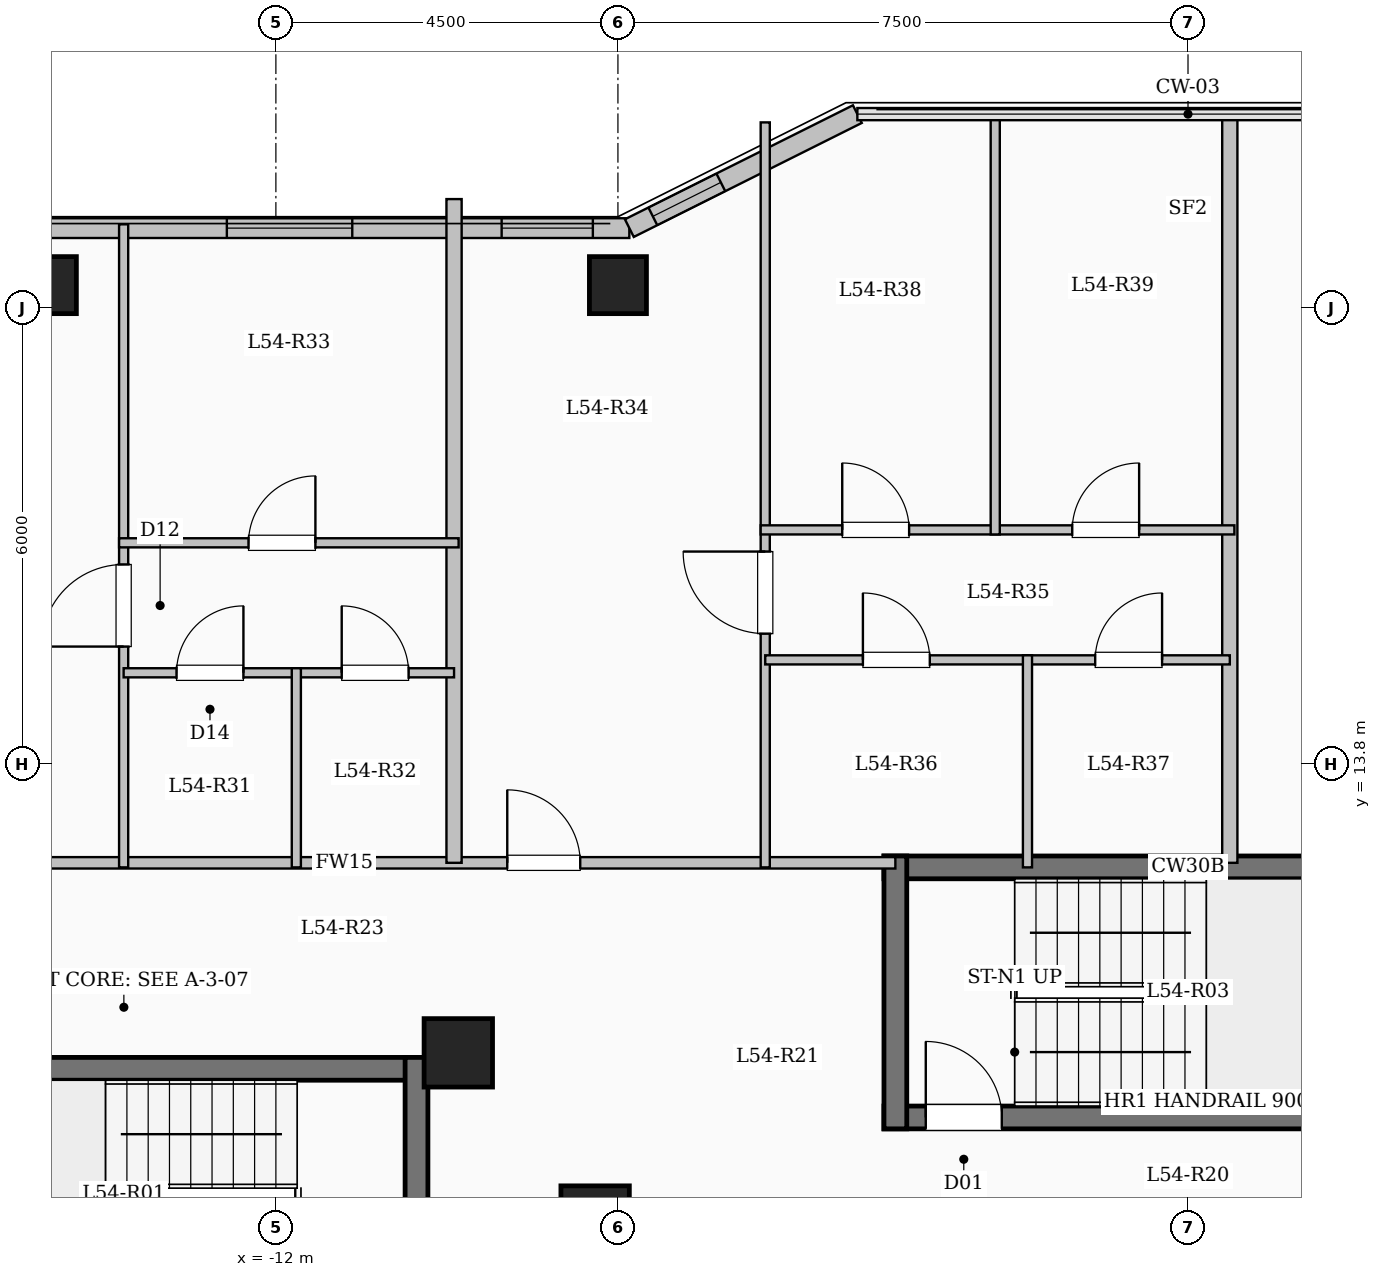
"""IFC4 building model, lengths in metres.
Left out: names, types, materials, properties, quantities, classifications, styles, units other than length and angle.
Written with IfcOpenShell. Run it as: python <this file> out.ifc"""

import sys

from ifc_helpers import new_model, si_unit, direction, frame, frame_2d, origin, origin_2d, place, context, subcontext, project, spatial, rectangle, extrude, element, fill, save


model = new_model("IFC4")
c1 = context("Model", 3, precision=1e-05, world=origin(), true_north=direction((0.0, 1.0)))
c2 = subcontext(c1, "Body", "Model", "MODEL_VIEW")
j1 = project(units=[si_unit("LENGTHUNIT", "METRE"), si_unit("PLANEANGLEUNIT", "RADIAN")], contexts=[c1])
p1 = place(None, origin())
s1 = spatial("IfcSite", under=j1, at=p1, CompositionType="ELEMENT")
p2 = place(p1, origin())
s2 = spatial("IfcBuilding", under=s1, at=p2, CompositionType="ELEMENT")
p3 = place(p2, frame((0.0, 0.0, 200.3)))
s3 = spatial("IfcBuildingStorey", under=s2, at=p3, CompositionType="ELEMENT", Elevation=200.3)
for number, where, z_axis, x_axis in (
    (1, (-7.8, 7.8, 0.0), (0.0, 0.0, 1.0), (1.0, 0.0, 0.0)),
    (2, (-9.6, 10.0, 0.0), (0.0, 0.0, 1.0), (1.0, 0.0, 0.0)),
):
    element("IfcColumn", number, at=place(p3, frame(where, z_axis=z_axis, x_axis=x_axis)), inside=s3, PredefinedType="COLUMN", context=c2, shape_type="SweptSolid", body=[
        extrude(rectangle(XDim=0.9, YDim=0.9, at=origin_2d()), origin(), (0.0, 0.0, 1.0), 3.35),
    ])
for number, where, z_axis, x_axis in (
    (3, (-15.0, 20.1, 0.0), (0.0, 0.0, 1.0), (1.0, 0.0, 0.0)),
    (4, (-7.5, 20.1, 0.0), (0.0, 0.0, 1.0), (1.0, 0.0, 0.0)),
):
    element("IfcColumn", number, at=place(p3, frame(where, z_axis=z_axis, x_axis=x_axis)), inside=s3, PredefinedType="COLUMN", context=c2, shape_type="SweptSolid", body=[
        extrude(rectangle(XDim=0.75, YDim=0.75, at=origin_2d()), origin(), (0.0, 0.0, 1.0), 3.35),
    ])
p4 = place(p3, frame((-18.45, 20.85, 0.0), z_axis=(0.0, 0.0, 1.0), x_axis=(1.0, 0.0, 0.0)))
e5 = element("IfcWall", 5, at=p4, inside=s3, PredefinedType="SOLIDWALL", context=c2, shape_type="SweptSolid", body=[
    extrude(rectangle(XDim=11.1, YDim=0.26, at=frame_2d((5.55, 0.0))), origin(), (0.0, 0.0, 1.0), 3.1),
])
p5 = place(p4, frame((1.16, 0.0, 0.9)))
e6 = element("IfcOpeningElement", 6, at=p5, cuts=e5, PredefinedType="OPENING", context=c2, shape_type="SweptSolid", body=[
    extrude(rectangle(XDim=2.2, YDim=1.75, at=frame_2d((1.1, 0.875))), frame((0.0, 0.14, 0.0), z_axis=(0.0, -1.0, 0.0), x_axis=(1.0, 0.0, 0.0)), (0.0, 0.0, 1.0), 0.28),
])
p6 = place(p4, frame((5.805, 0.0, 0.9)))
e7 = element("IfcOpeningElement", 7, at=p6, cuts=e5, PredefinedType="OPENING", context=c2, shape_type="SweptSolid", body=[
    extrude(rectangle(XDim=1.65, YDim=1.6, at=frame_2d((0.825, 0.8))), frame((0.0, 0.14, 0.0), z_axis=(0.0, -1.0, 0.0), x_axis=(1.0, 0.0, 0.0)), (0.0, 0.0, 1.0), 0.28),
])
p7 = place(p4, frame((9.42, 0.0, 0.95)))
e8 = element("IfcOpeningElement", 8, at=p7, cuts=e5, PredefinedType="OPENING", context=c2, shape_type="SweptSolid", body=[
    extrude(rectangle(XDim=1.2, YDim=1.5, at=frame_2d((0.6, 0.75))), frame((0.0, 0.14, 0.0), z_axis=(0.0, -1.0, 0.0), x_axis=(1.0, 0.0, 0.0)), (0.0, 0.0, 1.0), 0.28),
])
p8 = place(p3, frame((-7.35, 20.85, 0.0), z_axis=(0.0, 0.0, 1.0), x_axis=(0.894427191, 0.4472135955, 0.0)))
e9 = element("IfcWall", 9, at=p8, inside=s3, PredefinedType="SOLIDWALL", context=c2, shape_type="SweptSolid", body=[
    extrude(rectangle(XDim=3.354, YDim=0.26, at=frame_2d((1.677, 0.0))), origin(), (0.0, 0.0, 1.0), 3.1),
])
p9 = place(p8, frame((0.346, 0.0, 0.95)))
e10 = element("IfcOpeningElement", 10, at=p9, cuts=e9, PredefinedType="OPENING", context=c2, shape_type="SweptSolid", body=[
    extrude(rectangle(XDim=1.0, YDim=1.5, at=frame_2d((0.5, 0.75))), frame((0.0, 0.14, 0.0), z_axis=(0.0, -1.0, 0.0), x_axis=(1.0, 0.0, 0.0)), (0.0, 0.0, 1.0), 0.28),
])
p10 = place(p3, frame((-18.0, 9.79, 0.0), z_axis=(0.0, 0.0, 1.0), x_axis=(1.0, 0.0, 0.0)))
e11 = element("IfcWall", 11, at=p10, inside=s3, PredefinedType="SHEAR", context=c2, shape_type="SweptSolid", body=[
    extrude(rectangle(XDim=8.0, YDim=0.3, at=frame_2d((4.0, 0.0))), origin(), (0.0, 0.0, 1.0), 3.35),
])
p11 = place(p3, frame((-10.15, 6.35, 0.0), z_axis=(0.0, 0.0, 1.0), x_axis=(0.0, 1.0, 0.0)))
e12 = element("IfcWall", 12, at=p11, inside=s3, PredefinedType="SHEAR", context=c2, shape_type="SweptSolid", body=[
    extrude(rectangle(XDim=3.59, YDim=0.3, at=frame_2d((1.795, 0.0))), origin(), (0.0, 0.0, 1.0), 3.35),
])
p12 = place(p3, frame((-4.0, 12.44, 0.0), z_axis=(0.0, 0.0, 1.0), x_axis=(1.0, 0.0, 0.0)))
e13 = element("IfcWall", 13, at=p12, inside=s3, PredefinedType="SHEAR", context=c2, shape_type="SweptSolid", body=[
    extrude(rectangle(XDim=8.0, YDim=0.3, at=frame_2d((4.0, 0.0))), origin(), (0.0, 0.0, 1.0), 3.35),
])
p13 = place(p3, frame((-4.0, 9.15, 0.0), z_axis=(0.0, 0.0, 1.0), x_axis=(1.0, 0.0, 0.0)))
e14 = element("IfcWall", 14, at=p13, inside=s3, PredefinedType="SHEAR", context=c2, shape_type="SweptSolid", body=[
    extrude(rectangle(XDim=8.0, YDim=0.3, at=frame_2d((4.0, 0.0))), origin(), (0.0, 0.0, 1.0), 3.35),
])
p14 = place(p13, frame((0.55, 0.0, 0.0)))
e15 = element("IfcOpeningElement", 15, at=p14, cuts=e14, PredefinedType="OPENING", context=c2, shape_type="SweptSolid", body=[
    extrude(rectangle(XDim=1.0, YDim=2.15, at=frame_2d((0.5, 1.075))), frame((0.0, 0.16, 0.0), z_axis=(0.0, -1.0, 0.0), x_axis=(1.0, 0.0, 0.0)), (0.0, 0.0, 1.0), 0.32),
])
p15 = place(p3, frame((-3.85, 9.0, 0.0), z_axis=(0.0, 0.0, 1.0), x_axis=(0.0, 1.0, 0.0)))
e16 = element("IfcWall", 16, at=p15, inside=s3, PredefinedType="SHEAR", context=c2, shape_type="SweptSolid", body=[
    extrude(rectangle(XDim=3.59, YDim=0.3, at=frame_2d((1.795, 0.0))), origin(), (0.0, 0.0, 1.0), 3.35),
])
p16 = place(p3, frame((-18.35, 12.5, 0.0), z_axis=(0.0, 0.0, 1.0), x_axis=(1.0, 0.0, 0.0)))
e17 = element("IfcWall", 17, at=p16, inside=s3, PredefinedType="PARTITIONING", context=c2, shape_type="SweptSolid", body=[
    extrude(rectangle(XDim=14.5, YDim=0.15, at=frame_2d((7.25, 0.0))), origin(), (0.0, 0.0, 1.0), 3.1),
])
p17 = place(p16, frame((0.7, 0.0, 0.0)))
e18 = element("IfcOpeningElement", 18, at=p17, cuts=e17, PredefinedType="OPENING", context=c2, shape_type="SweptSolid", body=[
    extrude(rectangle(XDim=0.96, YDim=2.15, at=frame_2d((0.48, 1.075))), frame((0.0, 0.085, 0.0), z_axis=(0.0, -1.0, 0.0), x_axis=(1.0, 0.0, 0.0)), (0.0, 0.0, 1.0), 0.17),
])
p18 = place(p16, frame((9.394, 0.0, 0.0)))
e19 = element("IfcOpeningElement", 19, at=p18, cuts=e17, PredefinedType="OPENING", context=c2, shape_type="SweptSolid", body=[
    extrude(rectangle(XDim=0.96, YDim=2.15, at=frame_2d((0.48, 1.075))), frame((0.0, 0.085, 0.0), z_axis=(0.0, -1.0, 0.0), x_axis=(1.0, 0.0, 0.0)), (0.0, 0.0, 1.0), 0.17),
])
p19 = place(p3, frame((0.55, 12.5, 0.0), z_axis=(0.0, 0.0, 1.0), x_axis=(0.0, 1.0, 0.0)))
e20 = element("IfcWall", 20, at=p19, inside=s3, PredefinedType="SOLIDWALL", context=c2, shape_type="SweptSolid", body=[
    extrude(rectangle(XDim=9.88, YDim=0.2, at=frame_2d((4.94, 0.0))), origin(), (0.0, 0.0, 1.0), 3.1),
])
p20 = place(p3, frame((-9.656, 12.5, 0.0), z_axis=(0.0, 0.0, 1.0), x_axis=(0.0, 1.0, 0.0)))
e21 = element("IfcWall", 21, at=p20, inside=s3, PredefinedType="SOLIDWALL", context=c2, shape_type="SweptSolid", body=[
    extrude(rectangle(XDim=8.732, YDim=0.2, at=frame_2d((4.366, 0.0))), origin(), (0.0, 0.0, 1.0), 3.1),
])
p21 = place(p3, frame((-14.003, 12.44, 0.0), z_axis=(0.0, 0.0, 1.0), x_axis=(0.0, 1.0, 0.0)))
e22 = element("IfcWall", 22, at=p21, inside=s3, PredefinedType="PARTITIONING", context=c2, shape_type="SweptSolid", body=[
    extrude(rectangle(XDim=8.46, YDim=0.12, at=frame_2d((4.23, 0.0))), origin(), (0.0, 0.0, 1.0), 3.1),
])
p22 = place(p21, frame((2.905, 0.0, 0.0)))
e23 = element("IfcOpeningElement", 23, at=p22, cuts=e22, PredefinedType="OPENING", context=c2, shape_type="SweptSolid", body=[
    extrude(rectangle(XDim=1.08, YDim=2.15, at=frame_2d((0.54, 1.075))), frame((0.0, 0.07, 0.0), z_axis=(0.0, -1.0, 0.0), x_axis=(1.0, 0.0, 0.0)), (0.0, 0.0, 1.0), 0.14),
])
p23 = place(p3, frame((-14.003, 15.0, 0.0), z_axis=(0.0, 0.0, 1.0), x_axis=(1.0, 0.0, 0.0)))
e24 = element("IfcWall", 24, at=p23, inside=s3, PredefinedType="PARTITIONING", context=c2, shape_type="SweptSolid", body=[
    extrude(rectangle(XDim=2.272, YDim=0.12, at=frame_2d((1.136, 0.0))), origin(), (0.0, 0.0, 1.0), 3.1),
])
p24 = place(p23, frame((0.696, 0.0, 0.0)))
e25 = element("IfcOpeningElement", 25, at=p24, cuts=e24, PredefinedType="OPENING", context=c2, shape_type="SweptSolid", body=[
    extrude(rectangle(XDim=0.88, YDim=2.1, at=frame_2d((0.44, 1.05))), frame((0.0, 0.07, 0.0), z_axis=(0.0, -1.0, 0.0), x_axis=(1.0, 0.0, 0.0)), (0.0, 0.0, 1.0), 0.14),
])
p25 = place(p3, frame((-11.731, 15.0, 0.0), z_axis=(0.0, 0.0, 1.0), x_axis=(1.0, 0.0, 0.0)))
e26 = element("IfcWall", 26, at=p25, inside=s3, PredefinedType="PARTITIONING", context=c2, shape_type="SweptSolid", body=[
    extrude(rectangle(XDim=2.075, YDim=0.12, at=frame_2d((1.038, 0.0))), origin(), (0.0, 0.0, 1.0), 3.1),
])
p26 = place(p25, frame((0.597, 0.0, 0.0)))
e27 = element("IfcOpeningElement", 27, at=p26, cuts=e26, PredefinedType="OPENING", context=c2, shape_type="SweptSolid", body=[
    extrude(rectangle(XDim=0.88, YDim=2.1, at=frame_2d((0.44, 1.05))), frame((0.0, 0.07, 0.0), z_axis=(0.0, -1.0, 0.0), x_axis=(1.0, 0.0, 0.0)), (0.0, 0.0, 1.0), 0.14),
])
p27 = place(p3, frame((-14.063, 16.71, 0.0), z_axis=(0.0, 0.0, 1.0), x_axis=(1.0, 0.0, 0.0)))
e28 = element("IfcWall", 28, at=p27, inside=s3, PredefinedType="PARTITIONING", context=c2, shape_type="SweptSolid", body=[
    extrude(rectangle(XDim=4.467, YDim=0.12, at=frame_2d((2.233, 0.0))), origin(), (0.0, 0.0, 1.0), 2.725),
])
p28 = place(p27, frame((1.703, 0.0, 0.0)))
e29 = element("IfcOpeningElement", 29, at=p28, cuts=e28, PredefinedType="OPENING", context=c2, shape_type="SweptSolid", body=[
    extrude(rectangle(XDim=0.88, YDim=2.1, at=frame_2d((0.44, 1.05))), frame((0.0, 0.07, 0.0), z_axis=(0.0, -1.0, 0.0), x_axis=(1.0, 0.0, 0.0)), (0.0, 0.0, 1.0), 0.14),
])
p29 = place(p3, frame((-11.731, 12.44, 0.0), z_axis=(0.0, 0.0, 1.0), x_axis=(0.0, 1.0, 0.0)))
e30 = element("IfcWall", 30, at=p29, inside=s3, PredefinedType="PARTITIONING", context=c2, shape_type="SweptSolid", body=[
    extrude(rectangle(XDim=2.62, YDim=0.12, at=frame_2d((1.31, 0.0))), origin(), (0.0, 0.0, 1.0), 3.1),
])
p30 = place(p3, frame((-5.562, 12.44, 0.0), z_axis=(0.0, 0.0, 1.0), x_axis=(0.0, 1.0, 0.0)))
e31 = element("IfcWall", 31, at=p30, inside=s3, PredefinedType="PARTITIONING", context=c2, shape_type="SweptSolid", body=[
    extrude(rectangle(XDim=9.801, YDim=0.12, at=frame_2d((4.9, 0.0))), origin(), (0.0, 0.0, 1.0), 3.1),
])
p31 = place(p30, frame((3.075, 0.0, 0.0)))
e32 = element("IfcOpeningElement", 32, at=p31, cuts=e31, PredefinedType="OPENING", context=c2, shape_type="SweptSolid", body=[
    extrude(rectangle(XDim=1.08, YDim=2.15, at=frame_2d((0.54, 1.075))), frame((0.0, 0.07, 0.0), z_axis=(0.0, -1.0, 0.0), x_axis=(1.0, 0.0, 0.0)), (0.0, 0.0, 1.0), 0.14),
])
p32 = place(p3, frame((-5.562, 15.17, 0.0), z_axis=(0.0, 0.0, 1.0), x_axis=(1.0, 0.0, 0.0)))
e33 = element("IfcWall", 33, at=p32, inside=s3, PredefinedType="PARTITIONING", context=c2, shape_type="SweptSolid", body=[
    extrude(rectangle(XDim=3.45, YDim=0.12, at=frame_2d((1.725, 0.0))), origin(), (0.0, 0.0, 1.0), 3.1),
])
p33 = place(p32, frame((1.285, 0.0, 0.0)))
e34 = element("IfcOpeningElement", 34, at=p33, cuts=e33, PredefinedType="OPENING", context=c2, shape_type="SweptSolid", body=[
    extrude(rectangle(XDim=0.88, YDim=2.1, at=frame_2d((0.44, 1.05))), frame((0.0, 0.07, 0.0), z_axis=(0.0, -1.0, 0.0), x_axis=(1.0, 0.0, 0.0)), (0.0, 0.0, 1.0), 0.14),
])
p34 = place(p3, frame((-2.112, 15.17, 0.0), z_axis=(0.0, 0.0, 1.0), x_axis=(1.0, 0.0, 0.0)))
e35 = element("IfcWall", 35, at=p34, inside=s3, PredefinedType="PARTITIONING", context=c2, shape_type="SweptSolid", body=[
    extrude(rectangle(XDim=2.662, YDim=0.12, at=frame_2d((1.331, 0.0))), origin(), (0.0, 0.0, 1.0), 3.1),
])
p35 = place(p34, frame((0.891, 0.0, 0.0)))
e36 = element("IfcOpeningElement", 36, at=p35, cuts=e35, PredefinedType="OPENING", context=c2, shape_type="SweptSolid", body=[
    extrude(rectangle(XDim=0.88, YDim=2.1, at=frame_2d((0.44, 1.05))), frame((0.0, 0.07, 0.0), z_axis=(0.0, -1.0, 0.0), x_axis=(1.0, 0.0, 0.0)), (0.0, 0.0, 1.0), 0.14),
])
p36 = place(p3, frame((-5.622, 16.88, 0.0), z_axis=(0.0, 0.0, 1.0), x_axis=(1.0, 0.0, 0.0)))
e37 = element("IfcWall", 37, at=p36, inside=s3, PredefinedType="PARTITIONING", context=c2, shape_type="SweptSolid", body=[
    extrude(rectangle(XDim=6.232, YDim=0.12, at=frame_2d((3.116, 0.0))), origin(), (0.0, 0.0, 1.0), 2.725),
])
p37 = place(p36, frame((1.073, 0.0, 0.0)))
e38 = element("IfcOpeningElement", 38, at=p37, cuts=e37, PredefinedType="OPENING", context=c2, shape_type="SweptSolid", body=[
    extrude(rectangle(XDim=0.88, YDim=2.1, at=frame_2d((0.44, 1.05))), frame((0.0, 0.07, 0.0), z_axis=(0.0, -1.0, 0.0), x_axis=(1.0, 0.0, 0.0)), (0.0, 0.0, 1.0), 0.14),
])
p38 = place(p36, frame((4.099, 0.0, 0.0)))
e39 = element("IfcOpeningElement", 39, at=p38, cuts=e37, PredefinedType="OPENING", context=c2, shape_type="SweptSolid", body=[
    extrude(rectangle(XDim=0.88, YDim=2.1, at=frame_2d((0.44, 1.05))), frame((0.0, 0.07, 0.0), z_axis=(0.0, -1.0, 0.0), x_axis=(1.0, 0.0, 0.0)), (0.0, 0.0, 1.0), 0.14),
])
p39 = place(p3, frame((-2.112, 12.44, 0.0), z_axis=(0.0, 0.0, 1.0), x_axis=(0.0, 1.0, 0.0)))
e40 = element("IfcWall", 40, at=p39, inside=s3, PredefinedType="PARTITIONING", context=c2, shape_type="SweptSolid", body=[
    extrude(rectangle(XDim=2.79, YDim=0.12, at=frame_2d((1.395, 0.0))), origin(), (0.0, 0.0, 1.0), 3.1),
])
p40 = place(p3, frame((-2.536, 16.82, 0.0), z_axis=(0.0, 0.0, 1.0), x_axis=(0.0, 1.0, 0.0)))
e41 = element("IfcWall", 41, at=p40, inside=s3, PredefinedType="PARTITIONING", context=c2, shape_type="SweptSolid", body=[
    extrude(rectangle(XDim=5.56, YDim=0.12, at=frame_2d((2.78, 0.0))), origin(), (0.0, 0.0, 1.0), 3.1),
])
p41 = place(p6, origin())
e42 = element("IfcWindow", 42, at=p41, inside=s3, PartitioningType="SINGLE_PANEL", PredefinedType="WINDOW", context=c2, shape_type="SweptSolid", body=[
    extrude(rectangle(XDim=1.65, YDim=1.6, at=frame_2d((0.825, 0.8))), frame((0.0, 0.03, 0.0), z_axis=(0.0, -1.0, 0.0), x_axis=(1.0, 0.0, 0.0)), (0.0, 0.0, 1.0), 0.06),
])
fill(e7, e42)
p42 = place(p7, origin())
e43 = element("IfcWindow", 43, at=p42, inside=s3, PartitioningType="SINGLE_PANEL", PredefinedType="WINDOW", context=c2, shape_type="SweptSolid", body=[
    extrude(rectangle(XDim=1.2, YDim=1.5, at=frame_2d((0.6, 0.75))), frame((0.0, 0.03, 0.0), z_axis=(0.0, -1.0, 0.0), x_axis=(1.0, 0.0, 0.0)), (0.0, 0.0, 1.0), 0.06),
])
fill(e8, e43)
p43 = place(p9, origin())
e44 = element("IfcWindow", 44, at=p43, inside=s3, PartitioningType="SINGLE_PANEL", PredefinedType="WINDOW", context=c2, shape_type="SweptSolid", body=[
    extrude(rectangle(XDim=1.0, YDim=1.5, at=frame_2d((0.5, 0.75))), frame((0.0, 0.03, 0.0), z_axis=(0.0, -1.0, 0.0), x_axis=(1.0, 0.0, 0.0)), (0.0, 0.0, 1.0), 0.06),
])
fill(e10, e44)
p44 = place(p14, origin())
e45 = element("IfcDoor", 45, at=p44, inside=s3, OperationType="SINGLE_SWING_LEFT", PredefinedType="DOOR", context=c2, shape_type="SweptSolid", body=[
    extrude(rectangle(XDim=1.0, YDim=2.15, at=frame_2d((0.5, 1.075))), frame((0.0, 0.025, 0.0), z_axis=(0.0, -1.0, 0.0), x_axis=(1.0, 0.0, 0.0)), (0.0, 0.0, 1.0), 0.05),
])
fill(e15, e45)
p45 = place(p22, origin())
e46 = element("IfcDoor", 46, at=p45, inside=s3, OperationType="SINGLE_SWING_LEFT", PredefinedType="DOOR", context=c2, shape_type="SweptSolid", body=[
    extrude(rectangle(XDim=1.08, YDim=2.15, at=frame_2d((0.54, 1.075))), frame((0.0, 0.025, 0.0), z_axis=(0.0, -1.0, 0.0), x_axis=(1.0, 0.0, 0.0)), (0.0, 0.0, 1.0), 0.05),
])
fill(e23, e46)
p46 = place(p24, origin())
e47 = element("IfcDoor", 47, at=p46, inside=s3, OperationType="SINGLE_SWING_RIGHT", PredefinedType="DOOR", context=c2, shape_type="SweptSolid", body=[
    extrude(rectangle(XDim=0.88, YDim=2.1, at=frame_2d((0.44, 1.05))), frame((0.0, 0.025, 0.0), z_axis=(0.0, -1.0, 0.0), x_axis=(1.0, 0.0, 0.0)), (0.0, 0.0, 1.0), 0.05),
])
fill(e25, e47)
p47 = place(p26, origin())
e48 = element("IfcDoor", 48, at=p47, inside=s3, OperationType="SINGLE_SWING_LEFT", PredefinedType="DOOR", context=c2, shape_type="SweptSolid", body=[
    extrude(rectangle(XDim=0.88, YDim=2.1, at=frame_2d((0.44, 1.05))), frame((0.0, 0.025, 0.0), z_axis=(0.0, -1.0, 0.0), x_axis=(1.0, 0.0, 0.0)), (0.0, 0.0, 1.0), 0.05),
])
fill(e27, e48)
p48 = place(p28, origin())
e49 = element("IfcDoor", 49, at=p48, inside=s3, OperationType="SINGLE_SWING_RIGHT", PredefinedType="DOOR", context=c2, shape_type="SweptSolid", body=[
    extrude(rectangle(XDim=0.88, YDim=2.1, at=frame_2d((0.44, 1.05))), frame((0.0, 0.025, 0.0), z_axis=(0.0, -1.0, 0.0), x_axis=(1.0, 0.0, 0.0)), (0.0, 0.0, 1.0), 0.05),
])
fill(e29, e49)
p49 = place(p18, origin())
e50 = element("IfcDoor", 50, at=p49, inside=s3, OperationType="SINGLE_SWING_LEFT", PredefinedType="DOOR", context=c2, shape_type="SweptSolid", body=[
    extrude(rectangle(XDim=0.96, YDim=2.15, at=frame_2d((0.48, 1.075))), frame((0.0, 0.025, 0.0), z_axis=(0.0, -1.0, 0.0), x_axis=(1.0, 0.0, 0.0)), (0.0, 0.0, 1.0), 0.05),
])
fill(e19, e50)
p50 = place(p31, origin())
e51 = element("IfcDoor", 51, at=p50, inside=s3, OperationType="SINGLE_SWING_RIGHT", PredefinedType="DOOR", context=c2, shape_type="SweptSolid", body=[
    extrude(rectangle(XDim=1.08, YDim=2.15, at=frame_2d((0.54, 1.075))), frame((0.0, 0.025, 0.0), z_axis=(0.0, -1.0, 0.0), x_axis=(1.0, 0.0, 0.0)), (0.0, 0.0, 1.0), 0.05),
])
fill(e32, e51)
p51 = place(p33, origin())
e52 = element("IfcDoor", 52, at=p51, inside=s3, OperationType="SINGLE_SWING_LEFT", PredefinedType="DOOR", context=c2, shape_type="SweptSolid", body=[
    extrude(rectangle(XDim=0.88, YDim=2.1, at=frame_2d((0.44, 1.05))), frame((0.0, 0.025, 0.0), z_axis=(0.0, -1.0, 0.0), x_axis=(1.0, 0.0, 0.0)), (0.0, 0.0, 1.0), 0.05),
])
fill(e34, e52)
p52 = place(p35, origin())
e53 = element("IfcDoor", 53, at=p52, inside=s3, OperationType="SINGLE_SWING_RIGHT", PredefinedType="DOOR", context=c2, shape_type="SweptSolid", body=[
    extrude(rectangle(XDim=0.88, YDim=2.1, at=frame_2d((0.44, 1.05))), frame((0.0, 0.025, 0.0), z_axis=(0.0, -1.0, 0.0), x_axis=(1.0, 0.0, 0.0)), (0.0, 0.0, 1.0), 0.05),
])
fill(e36, e53)
p53 = place(p37, origin())
e54 = element("IfcDoor", 54, at=p53, inside=s3, OperationType="SINGLE_SWING_LEFT", PredefinedType="DOOR", context=c2, shape_type="SweptSolid", body=[
    extrude(rectangle(XDim=0.88, YDim=2.1, at=frame_2d((0.44, 1.05))), frame((0.0, 0.025, 0.0), z_axis=(0.0, -1.0, 0.0), x_axis=(1.0, 0.0, 0.0)), (0.0, 0.0, 1.0), 0.05),
])
fill(e38, e54)
p54 = place(p38, origin())
e55 = element("IfcDoor", 55, at=p54, inside=s3, OperationType="SINGLE_SWING_RIGHT", PredefinedType="DOOR", context=c2, shape_type="SweptSolid", body=[
    extrude(rectangle(XDim=0.88, YDim=2.1, at=frame_2d((0.44, 1.05))), frame((0.0, 0.025, 0.0), z_axis=(0.0, -1.0, 0.0), x_axis=(1.0, 0.0, 0.0)), (0.0, 0.0, 1.0), 0.05),
])
fill(e39, e55)
save(model, sys.argv[1])
